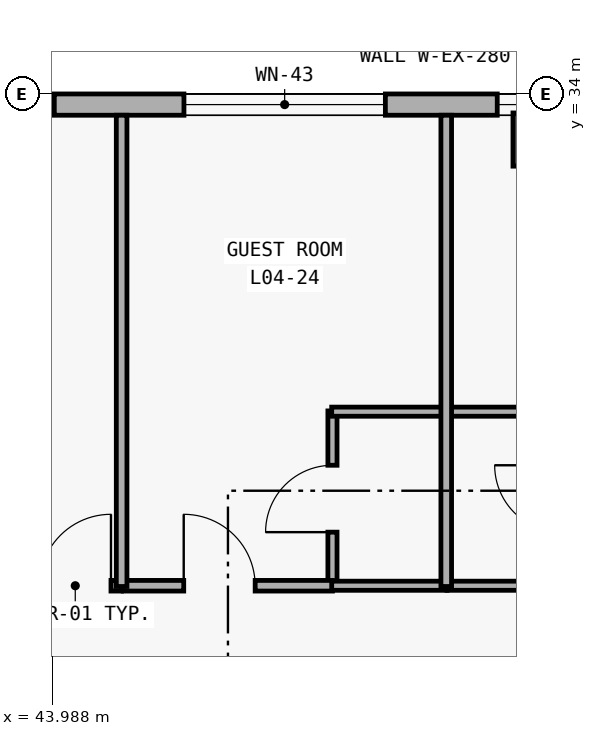
"""IFC4 building model, lengths in metres.
Left out: names, types, materials, properties, quantities, classifications, styles, units other than length and angle.
Written with IfcOpenShell. Run it as: python <this file> out.ifc"""

import sys

from ifc_helpers import new_model, si_unit, direction, frame, frame_2d, origin, origin_2d, place, context, subcontext, project, spatial, rectangle, extrude, element, fill, save


model = new_model("IFC4")
c1 = context("Model", 3, precision=1e-05, world=origin(), true_north=direction((0.0, 1.0)))
c2 = subcontext(c1, "Body", "Model", "MODEL_VIEW")
j1 = project(units=[si_unit("LENGTHUNIT", "METRE"), si_unit("PLANEANGLEUNIT", "RADIAN")], contexts=[c1])
p1 = place(None, origin())
s1 = spatial("IfcSite", under=j1, at=p1, CompositionType="ELEMENT")
p2 = place(p1, origin())
s2 = spatial("IfcBuilding", under=s1, at=p2, CompositionType="ELEMENT")
p3 = place(p2, frame((0.0, 0.0, 19.2)))
s3 = spatial("IfcBuildingStorey", under=s2, at=p3, CompositionType="ELEMENT", Elevation=19.2)
p4 = place(p3, frame((50.4, 33.4, 0.0), z_axis=(0.0, 0.0, 1.0), x_axis=(1.0, 0.0, 0.0)))
e1 = element("IfcColumn", 1, at=p4, inside=s3, PredefinedType="COLUMN", context=c2, shape_type="SweptSolid", body=[
    extrude(rectangle(XDim=0.7, YDim=0.7, at=origin_2d()), origin(), (0.0, 0.0, 1.0), 3.6),
])
p5 = place(p3, frame((8.68, 33.86, 0.0), z_axis=(0.0, 0.0, 1.0), x_axis=(1.0, 0.0, 0.0)))
e2 = element("IfcWall", 2, at=p5, inside=s3, PredefinedType="SOLIDWALL", context=c2, shape_type="SweptSolid", body=[
    extrude(rectangle(XDim=83.44, YDim=0.28, at=frame_2d((41.72, 0.0))), origin(), (0.0, 0.0, 1.0), 3.32),
])
p6 = place(p5, frame((4.745, 0.0, 0.85)))
e3 = element("IfcOpeningElement", 3, at=p6, cuts=e2, PredefinedType="OPENING", context=c2, shape_type="SweptSolid", body=[
    extrude(rectangle(XDim=1.25, YDim=1.45, at=frame_2d((0.625, 0.725))), frame((0.0, 0.15, 0.0), z_axis=(0.0, -1.0, 0.0), x_axis=(1.0, 0.0, 0.0)), (0.0, 0.0, 1.0), 0.3),
])
p7 = place(p5, frame((11.846, 0.0, 0.85)))
e4 = element("IfcOpeningElement", 4, at=p7, cuts=e2, PredefinedType="OPENING", context=c2, shape_type="SweptSolid", body=[
    extrude(rectangle(XDim=1.78, YDim=1.95, at=frame_2d((0.89, 0.975))), frame((0.0, 0.15, 0.0), z_axis=(0.0, -1.0, 0.0), x_axis=(1.0, 0.0, 0.0)), (0.0, 0.0, 1.0), 0.3),
])
p8 = place(p5, frame((16.068, 0.0, 0.85)))
e5 = element("IfcOpeningElement", 5, at=p8, cuts=e2, PredefinedType="OPENING", context=c2, shape_type="SweptSolid", body=[
    extrude(rectangle(XDim=1.88, YDim=1.95, at=frame_2d((0.94, 0.975))), frame((0.0, 0.15, 0.0), z_axis=(0.0, -1.0, 0.0), x_axis=(1.0, 0.0, 0.0)), (0.0, 0.0, 1.0), 0.3),
])
p9 = place(p5, frame((20.255, 0.0, 0.85)))
e6 = element("IfcOpeningElement", 6, at=p9, cuts=e2, PredefinedType="OPENING", context=c2, shape_type="SweptSolid", body=[
    extrude(rectangle(XDim=2.05, YDim=1.95, at=frame_2d((1.025, 0.975))), frame((0.0, 0.15, 0.0), z_axis=(0.0, -1.0, 0.0), x_axis=(1.0, 0.0, 0.0)), (0.0, 0.0, 1.0), 0.3),
])
p10 = place(p5, frame((24.461, 0.0, 0.85)))
e7 = element("IfcOpeningElement", 7, at=p10, cuts=e2, PredefinedType="OPENING", context=c2, shape_type="SweptSolid", body=[
    extrude(rectangle(XDim=2.18, YDim=1.95, at=frame_2d((1.09, 0.975))), frame((0.0, 0.15, 0.0), z_axis=(0.0, -1.0, 0.0), x_axis=(1.0, 0.0, 0.0)), (0.0, 0.0, 1.0), 0.3),
])
p11 = place(p5, frame((28.633, 0.0, 0.85)))
e8 = element("IfcOpeningElement", 8, at=p11, cuts=e2, PredefinedType="OPENING", context=c2, shape_type="SweptSolid", body=[
    extrude(rectangle(XDim=2.38, YDim=1.95, at=frame_2d((1.19, 0.975))), frame((0.0, 0.15, 0.0), z_axis=(0.0, -1.0, 0.0), x_axis=(1.0, 0.0, 0.0)), (0.0, 0.0, 1.0), 0.3),
])
p12 = place(p5, frame((32.855, 0.0, 0.85)))
e9 = element("IfcOpeningElement", 9, at=p12, cuts=e2, PredefinedType="OPENING", context=c2, shape_type="SweptSolid", body=[
    extrude(rectangle(XDim=2.48, YDim=2.0, at=frame_2d((1.24, 1.0))), frame((0.0, 0.15, 0.0), z_axis=(0.0, -1.0, 0.0), x_axis=(1.0, 0.0, 0.0)), (0.0, 0.0, 1.0), 0.3),
])
p13 = place(p5, frame((37.041, 0.0, 0.85)))
e10 = element("IfcOpeningElement", 10, at=p13, cuts=e2, PredefinedType="OPENING", context=c2, shape_type="SweptSolid", body=[
    extrude(rectangle(XDim=2.65, YDim=2.0, at=frame_2d((1.325, 1.0))), frame((0.0, 0.15, 0.0), z_axis=(0.0, -1.0, 0.0), x_axis=(1.0, 0.0, 0.0)), (0.0, 0.0, 1.0), 0.3),
])
p14 = place(p5, frame((41.163, 0.0, 0.85)))
e11 = element("IfcOpeningElement", 11, at=p14, cuts=e2, PredefinedType="OPENING", context=c2, shape_type="SweptSolid", body=[
    extrude(rectangle(XDim=2.95, YDim=2.05, at=frame_2d((1.475, 1.025))), frame((0.0, 0.15, 0.0), z_axis=(0.0, -1.0, 0.0), x_axis=(1.0, 0.0, 0.0)), (0.0, 0.0, 1.0), 0.3),
])
p15 = place(p5, frame((45.21, 0.0, 0.85)))
e12 = element("IfcOpeningElement", 12, at=p15, cuts=e2, PredefinedType="OPENING", context=c2, shape_type="SweptSolid", body=[
    extrude(rectangle(XDim=3.4, YDim=2.1, at=frame_2d((1.7, 1.05))), frame((0.0, 0.15, 0.0), z_axis=(0.0, -1.0, 0.0), x_axis=(1.0, 0.0, 0.0)), (0.0, 0.0, 1.0), 0.3),
])
p16 = place(p5, frame((50.282, 0.0, 0.85)))
e13 = element("IfcOpeningElement", 13, at=p16, cuts=e2, PredefinedType="OPENING", context=c2, shape_type="SweptSolid", body=[
    extrude(rectangle(XDim=1.8, YDim=1.8, at=frame_2d((0.9, 0.9))), frame((0.0, 0.15, 0.0), z_axis=(0.0, -1.0, 0.0), x_axis=(1.0, 0.0, 0.0)), (0.0, 0.0, 1.0), 0.3),
])
p17 = place(p5, frame((54.404, 0.0, 0.85)))
e14 = element("IfcOpeningElement", 14, at=p17, cuts=e2, PredefinedType="OPENING", context=c2, shape_type="SweptSolid", body=[
    extrude(rectangle(XDim=2.1, YDim=1.8, at=frame_2d((1.05, 0.9))), frame((0.0, 0.15, 0.0), z_axis=(0.0, -1.0, 0.0), x_axis=(1.0, 0.0, 0.0)), (0.0, 0.0, 1.0), 0.3),
])
p18 = place(p5, frame((58.525, 0.0, 0.85)))
e15 = element("IfcOpeningElement", 15, at=p18, cuts=e2, PredefinedType="OPENING", context=c2, shape_type="SweptSolid", body=[
    extrude(rectangle(XDim=2.4, YDim=1.8, at=frame_2d((1.2, 0.9))), frame((0.0, 0.15, 0.0), z_axis=(0.0, -1.0, 0.0), x_axis=(1.0, 0.0, 0.0)), (0.0, 0.0, 1.0), 0.3),
])
p19 = place(p5, frame((62.647, 0.0, 0.85)))
e16 = element("IfcOpeningElement", 16, at=p19, cuts=e2, PredefinedType="OPENING", context=c2, shape_type="SweptSolid", body=[
    extrude(rectangle(XDim=2.7, YDim=1.85, at=frame_2d((1.35, 0.925))), frame((0.0, 0.15, 0.0), z_axis=(0.0, -1.0, 0.0), x_axis=(1.0, 0.0, 0.0)), (0.0, 0.0, 1.0), 0.3),
])
p20 = place(p5, frame((66.769, 0.0, 0.85)))
e17 = element("IfcOpeningElement", 17, at=p20, cuts=e2, PredefinedType="OPENING", context=c2, shape_type="SweptSolid", body=[
    extrude(rectangle(XDim=3.0, YDim=1.9, at=frame_2d((1.5, 0.95))), frame((0.0, 0.15, 0.0), z_axis=(0.0, -1.0, 0.0), x_axis=(1.0, 0.0, 0.0)), (0.0, 0.0, 1.0), 0.3),
])
p21 = place(p5, frame((71.791, 0.0, 0.85)))
e18 = element("IfcOpeningElement", 18, at=p21, cuts=e2, PredefinedType="OPENING", context=c2, shape_type="SweptSolid", body=[
    extrude(rectangle(XDim=1.5, YDim=1.75, at=frame_2d((0.75, 0.875))), frame((0.0, 0.15, 0.0), z_axis=(0.0, -1.0, 0.0), x_axis=(1.0, 0.0, 0.0)), (0.0, 0.0, 1.0), 0.3),
])
p22 = place(p5, frame((75.987, 0.0, 0.85)))
e19 = element("IfcOpeningElement", 19, at=p22, cuts=e2, PredefinedType="OPENING", context=c2, shape_type="SweptSolid", body=[
    extrude(rectangle(XDim=1.65, YDim=1.75, at=frame_2d((0.825, 0.875))), frame((0.0, 0.15, 0.0), z_axis=(0.0, -1.0, 0.0), x_axis=(1.0, 0.0, 0.0)), (0.0, 0.0, 1.0), 0.3),
])
p23 = place(p5, frame((80.109, 0.0, 0.85)))
e20 = element("IfcOpeningElement", 20, at=p23, cuts=e2, PredefinedType="OPENING", context=c2, shape_type="SweptSolid", body=[
    extrude(rectangle(XDim=1.95, YDim=1.75, at=frame_2d((0.975, 0.875))), frame((0.0, 0.15, 0.0), z_axis=(0.0, -1.0, 0.0), x_axis=(1.0, 0.0, 0.0)), (0.0, 0.0, 1.0), 0.3),
])
p24 = place(p3, frame((47.675, 27.52, 0.0), z_axis=(0.0, 0.0, 1.0), x_axis=(0.0, 1.0, 0.0)))
e21 = element("IfcWall", 21, at=p24, inside=s3, PredefinedType="PARTITIONING", context=c2, shape_type="SweptSolid", body=[
    extrude(rectangle(XDim=2.31, YDim=0.12, at=frame_2d((1.155, 0.0))), origin(), (0.0, 0.0, 1.0), 2.48),
])
p25 = place(p24, frame((0.715, 0.0, 0.0)))
e22 = element("IfcOpeningElement", 22, at=p25, cuts=e21, PredefinedType="OPENING", context=c2, shape_type="SweptSolid", body=[
    extrude(rectangle(XDim=0.88, YDim=2.15, at=frame_2d((0.44, 1.075))), frame((0.0, 0.07, 0.0), z_axis=(0.0, -1.0, 0.0), x_axis=(1.0, 0.0, 0.0)), (0.0, 0.0, 1.0), 0.14),
])
p26 = place(p3, frame((42.146, 27.53, 0.0), z_axis=(0.0, 0.0, 1.0), x_axis=(1.0, 0.0, 0.0)))
e23 = element("IfcWall", 23, at=p26, inside=s3, PredefinedType="PARTITIONING", context=c2, shape_type="SweptSolid", body=[
    extrude(rectangle(XDim=2.755, YDim=0.14, at=frame_2d((1.377, 0.0))), origin(), (0.0, 0.0, 1.0), 2.48),
])
p27 = place(p26, frame((1.675, 0.0, 0.0)))
e24 = element("IfcOpeningElement", 24, at=p27, cuts=e23, PredefinedType="OPENING", context=c2, shape_type="SweptSolid", body=[
    extrude(rectangle(XDim=0.94, YDim=2.2, at=frame_2d((0.47, 1.1))), frame((0.0, 0.08, 0.0), z_axis=(0.0, -1.0, 0.0), x_axis=(1.0, 0.0, 0.0)), (0.0, 0.0, 1.0), 0.16),
])
p28 = place(p3, frame((44.921, 27.53, 0.0), z_axis=(0.0, 0.0, 1.0), x_axis=(1.0, 0.0, 0.0)))
e25 = element("IfcWall", 25, at=p28, inside=s3, PredefinedType="PARTITIONING", context=c2, shape_type="SweptSolid", body=[
    extrude(rectangle(XDim=2.754, YDim=0.14, at=frame_2d((1.377, 0.0))), origin(), (0.0, 0.0, 1.0), 2.48),
])
p29 = place(p28, frame((0.797, 0.0, 0.0)))
e26 = element("IfcOpeningElement", 26, at=p29, cuts=e25, PredefinedType="OPENING", context=c2, shape_type="SweptSolid", body=[
    extrude(rectangle(XDim=0.94, YDim=2.2, at=frame_2d((0.47, 1.1))), frame((0.0, 0.08, 0.0), z_axis=(0.0, -1.0, 0.0), x_axis=(1.0, 0.0, 0.0)), (0.0, 0.0, 1.0), 0.16),
])
for number, where, z_axis, x_axis in (
    (27, (47.665, 27.53, 0.0), (0.0, 0.0, 1.0), (1.0, 0.0, 0.0)),
    (28, (47.665, 29.82, 0.0), (0.0, 0.0, 1.0), (1.0, 0.0, 0.0)),
):
    element("IfcWall", number, at=place(p3, frame(where, z_axis=z_axis, x_axis=x_axis)), inside=s3, PredefinedType="PARTITIONING", context=c2, shape_type="SweptSolid", body=[
        extrude(rectangle(XDim=1.517, YDim=0.12, at=frame_2d((0.758, 0.0))), origin(), (0.0, 0.0, 1.0), 2.48),
    ])
for number, where, z_axis, x_axis in (
    (29, (49.182, 27.53, 0.0), (0.0, 0.0, 1.0), (1.0, 0.0, 0.0)),
    (30, (49.182, 29.82, 0.0), (0.0, 0.0, 1.0), (1.0, 0.0, 0.0)),
):
    element("IfcWall", number, at=place(p3, frame(where, z_axis=z_axis, x_axis=x_axis)), inside=s3, PredefinedType="PARTITIONING", context=c2, shape_type="SweptSolid", body=[
        extrude(rectangle(XDim=1.517, YDim=0.12, at=frame_2d((0.759, 0.0))), origin(), (0.0, 0.0, 1.0), 2.48),
    ])
for number, where, z_axis, x_axis in (
    (31, (44.901, 27.52, 0.0), (0.0, 0.0, 1.0), (0.0, 1.0, 0.0)),
    (32, (49.172, 27.52, 0.0), (0.0, 0.0, 1.0), (0.0, 1.0, 0.0)),
):
    element("IfcWall", number, at=place(p3, frame(where, z_axis=z_axis, x_axis=x_axis)), inside=s3, PredefinedType="PARTITIONING", context=c2, shape_type="SweptSolid", body=[
        extrude(rectangle(XDim=6.2, YDim=0.14, at=frame_2d((3.1, 0.0))), origin(), (0.0, 0.0, 1.0), 2.48),
    ])
p30 = place(p12, origin())
e33 = element("IfcWindow", 33, at=p30, inside=s3, PartitioningType="SINGLE_PANEL", PredefinedType="WINDOW", context=c2, shape_type="SweptSolid", body=[
    extrude(rectangle(XDim=2.48, YDim=2.0, at=frame_2d((1.24, 1.0))), frame((0.0, 0.03, 0.0), z_axis=(0.0, -1.0, 0.0), x_axis=(1.0, 0.0, 0.0)), (0.0, 0.0, 1.0), 0.06),
])
fill(e9, e33)
p31 = place(p13, origin())
e34 = element("IfcWindow", 34, at=p31, inside=s3, PartitioningType="SINGLE_PANEL", PredefinedType="WINDOW", context=c2, shape_type="SweptSolid", body=[
    extrude(rectangle(XDim=2.65, YDim=2.0, at=frame_2d((1.325, 1.0))), frame((0.0, 0.03, 0.0), z_axis=(0.0, -1.0, 0.0), x_axis=(1.0, 0.0, 0.0)), (0.0, 0.0, 1.0), 0.06),
])
fill(e10, e34)
p32 = place(p14, origin())
e35 = element("IfcWindow", 35, at=p32, inside=s3, PartitioningType="SINGLE_PANEL", PredefinedType="WINDOW", context=c2, shape_type="SweptSolid", body=[
    extrude(rectangle(XDim=2.95, YDim=2.05, at=frame_2d((1.475, 1.025))), frame((0.0, 0.03, 0.0), z_axis=(0.0, -1.0, 0.0), x_axis=(1.0, 0.0, 0.0)), (0.0, 0.0, 1.0), 0.06),
])
fill(e11, e35)
p33 = place(p25, origin())
e36 = element("IfcDoor", 36, at=p33, inside=s3, OperationType="SINGLE_SWING_LEFT", PredefinedType="DOOR", context=c2, shape_type="SweptSolid", body=[
    extrude(rectangle(XDim=0.88, YDim=2.15, at=frame_2d((0.44, 1.075))), frame((0.0, 0.025, 0.0), z_axis=(0.0, -1.0, 0.0), x_axis=(1.0, 0.0, 0.0)), (0.0, 0.0, 1.0), 0.05),
])
fill(e22, e36)
p34 = place(p27, origin())
e37 = element("IfcDoor", 37, at=p34, inside=s3, OperationType="SINGLE_SWING_RIGHT", PredefinedType="DOOR", context=c2, shape_type="SweptSolid", body=[
    extrude(rectangle(XDim=0.94, YDim=2.2, at=frame_2d((0.47, 1.1))), frame((0.0, 0.025, 0.0), z_axis=(0.0, -1.0, 0.0), x_axis=(1.0, 0.0, 0.0)), (0.0, 0.0, 1.0), 0.05),
])
fill(e24, e37)
p35 = place(p29, origin())
e38 = element("IfcDoor", 38, at=p35, inside=s3, OperationType="SINGLE_SWING_LEFT", PredefinedType="DOOR", context=c2, shape_type="SweptSolid", body=[
    extrude(rectangle(XDim=0.94, YDim=2.2, at=frame_2d((0.47, 1.1))), frame((0.0, 0.025, 0.0), z_axis=(0.0, -1.0, 0.0), x_axis=(1.0, 0.0, 0.0)), (0.0, 0.0, 1.0), 0.05),
])
fill(e26, e38)
save(model, sys.argv[1])
